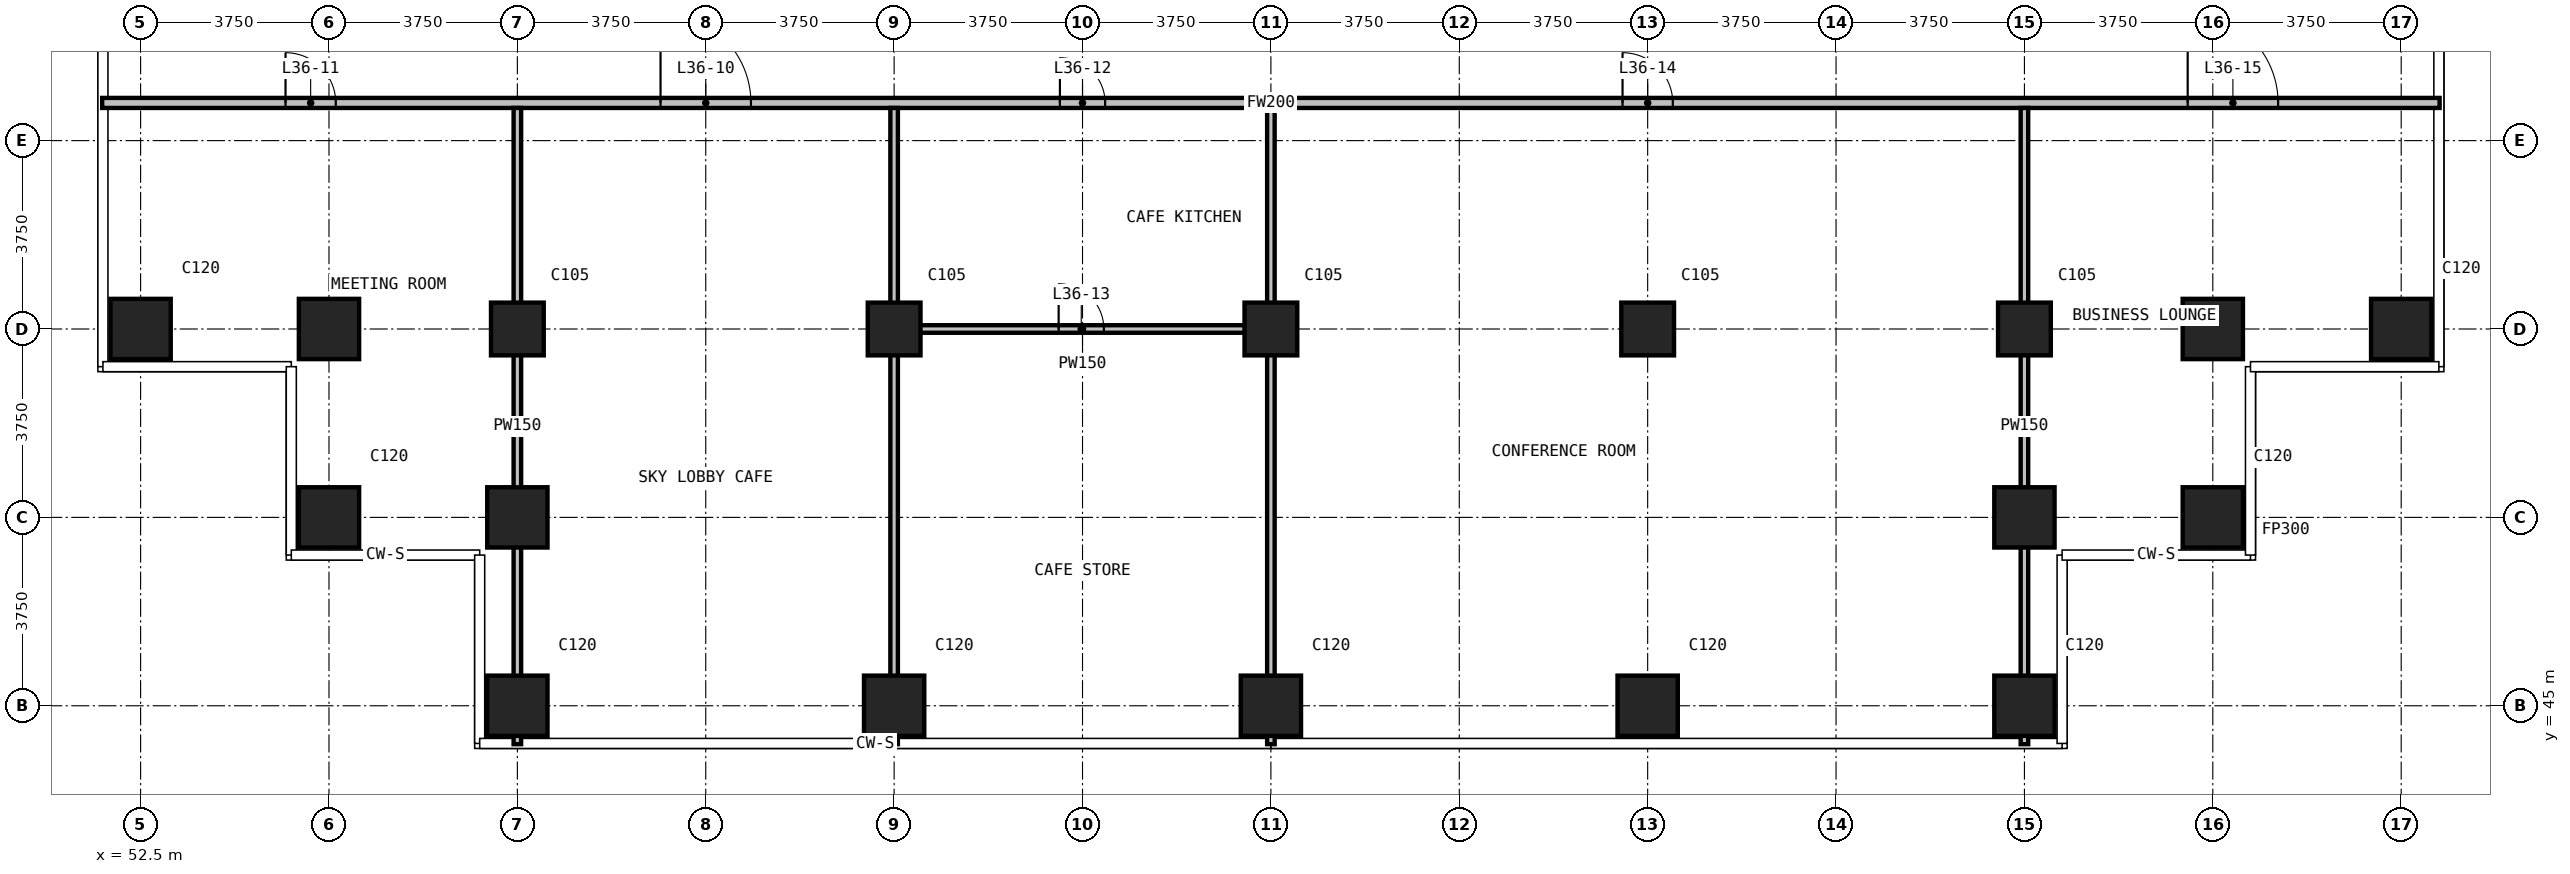
"""IFC4 building model, lengths in metres.
Left out: names, types, materials, properties, quantities, classifications, styles, units other than length and angle.
Written with IfcOpenShell. Run it as: python <this file> out.ifc"""

import sys

from ifc_helpers import new_model, si_unit, direction, frame, frame_2d, origin, origin_2d, place, context, subcontext, project, spatial, rectangle, extrude, element, fill, save


model = new_model("IFC4")
c1 = context("Model", 3, precision=1e-05, world=origin(), true_north=direction((0.0, 1.0)))
c2 = subcontext(c1, "Body", "Model", "MODEL_VIEW")
j1 = project(units=[si_unit("LENGTHUNIT", "METRE"), si_unit("PLANEANGLEUNIT", "RADIAN")], contexts=[c1])
p1 = place(None, origin())
s1 = spatial("IfcSite", under=j1, at=p1, CompositionType="ELEMENT")
p2 = place(p1, origin())
s2 = spatial("IfcBuilding", under=s1, at=p2, CompositionType="ELEMENT")
p3 = place(p2, frame((0.0, 0.0, 143.2)))
s3 = spatial("IfcBuildingStorey", under=s2, at=p3, CompositionType="ELEMENT", Elevation=143.2)
for number, where, z_axis, x_axis in (
    (1, (52.5, 52.5, 0.0), (0.0, 0.0, 1.0), (1.0, 0.0, 0.0)),
    (2, (56.25, 48.75, 0.0), (0.0, 0.0, 1.0), (1.0, 0.0, 0.0)),
    (3, (56.25, 52.5, 0.0), (0.0, 0.0, 1.0), (1.0, 0.0, 0.0)),
    (4, (60.0, 45.0, 0.0), (0.0, 0.0, 1.0), (1.0, 0.0, 0.0)),
    (5, (60.0, 48.75, 0.0), (0.0, 0.0, 1.0), (1.0, 0.0, 0.0)),
):
    element("IfcColumn", number, at=place(p3, frame(where, z_axis=z_axis, x_axis=x_axis)), inside=s3, PredefinedType="COLUMN", context=c2, shape_type="SweptSolid", body=[
        extrude(rectangle(XDim=1.2, YDim=1.2, at=origin_2d()), origin(), (0.0, 0.0, 1.0), 4.5),
    ])
p4 = place(p3, frame((60.0, 52.5, 0.0), z_axis=(0.0, 0.0, 1.0), x_axis=(1.0, 0.0, 0.0)))
e6 = element("IfcColumn", 6, at=p4, inside=s3, PredefinedType="COLUMN", context=c2, shape_type="SweptSolid", body=[
    extrude(rectangle(XDim=1.05, YDim=1.05, at=origin_2d()), origin(), (0.0, 0.0, 1.0), 4.5),
])
p5 = place(p3, frame((67.5, 45.0, 0.0), z_axis=(0.0, 0.0, 1.0), x_axis=(1.0, 0.0, 0.0)))
e7 = element("IfcColumn", 7, at=p5, inside=s3, PredefinedType="COLUMN", context=c2, shape_type="SweptSolid", body=[
    extrude(rectangle(XDim=1.2, YDim=1.2, at=origin_2d()), origin(), (0.0, 0.0, 1.0), 4.5),
])
p6 = place(p3, frame((67.5, 52.5, 0.0), z_axis=(0.0, 0.0, 1.0), x_axis=(1.0, 0.0, 0.0)))
e8 = element("IfcColumn", 8, at=p6, inside=s3, PredefinedType="COLUMN", context=c2, shape_type="SweptSolid", body=[
    extrude(rectangle(XDim=1.05, YDim=1.05, at=origin_2d()), origin(), (0.0, 0.0, 1.0), 4.5),
])
p7 = place(p3, frame((75.0, 45.0, 0.0), z_axis=(0.0, 0.0, 1.0), x_axis=(1.0, 0.0, 0.0)))
e9 = element("IfcColumn", 9, at=p7, inside=s3, PredefinedType="COLUMN", context=c2, shape_type="SweptSolid", body=[
    extrude(rectangle(XDim=1.2, YDim=1.2, at=origin_2d()), origin(), (0.0, 0.0, 1.0), 4.5),
])
p8 = place(p3, frame((75.0, 52.5, 0.0), z_axis=(0.0, 0.0, 1.0), x_axis=(1.0, 0.0, 0.0)))
e10 = element("IfcColumn", 10, at=p8, inside=s3, PredefinedType="COLUMN", context=c2, shape_type="SweptSolid", body=[
    extrude(rectangle(XDim=1.05, YDim=1.05, at=origin_2d()), origin(), (0.0, 0.0, 1.0), 4.5),
])
p9 = place(p3, frame((82.5, 45.0, 0.0), z_axis=(0.0, 0.0, 1.0), x_axis=(1.0, 0.0, 0.0)))
e11 = element("IfcColumn", 11, at=p9, inside=s3, PredefinedType="COLUMN", context=c2, shape_type="SweptSolid", body=[
    extrude(rectangle(XDim=1.2, YDim=1.2, at=origin_2d()), origin(), (0.0, 0.0, 1.0), 4.5),
])
p10 = place(p3, frame((82.5, 52.5, 0.0), z_axis=(0.0, 0.0, 1.0), x_axis=(1.0, 0.0, 0.0)))
e12 = element("IfcColumn", 12, at=p10, inside=s3, PredefinedType="COLUMN", context=c2, shape_type="SweptSolid", body=[
    extrude(rectangle(XDim=1.05, YDim=1.05, at=origin_2d()), origin(), (0.0, 0.0, 1.0), 4.5),
])
for number, where, z_axis, x_axis in (
    (13, (90.0, 45.0, 0.0), (0.0, 0.0, 1.0), (1.0, 0.0, 0.0)),
    (14, (90.0, 48.75, 0.0), (0.0, 0.0, 1.0), (1.0, 0.0, 0.0)),
):
    element("IfcColumn", number, at=place(p3, frame(where, z_axis=z_axis, x_axis=x_axis)), inside=s3, PredefinedType="COLUMN", context=c2, shape_type="SweptSolid", body=[
        extrude(rectangle(XDim=1.2, YDim=1.2, at=origin_2d()), origin(), (0.0, 0.0, 1.0), 4.5),
    ])
p11 = place(p3, frame((90.0, 52.5, 0.0), z_axis=(0.0, 0.0, 1.0), x_axis=(1.0, 0.0, 0.0)))
e15 = element("IfcColumn", 15, at=p11, inside=s3, PredefinedType="COLUMN", context=c2, shape_type="SweptSolid", body=[
    extrude(rectangle(XDim=1.05, YDim=1.05, at=origin_2d()), origin(), (0.0, 0.0, 1.0), 4.5),
])
for number, where, z_axis, x_axis in (
    (16, (93.75, 48.75, 0.0), (0.0, 0.0, 1.0), (1.0, 0.0, 0.0)),
    (17, (93.75, 52.5, 0.0), (0.0, 0.0, 1.0), (1.0, 0.0, 0.0)),
    (18, (97.5, 52.5, 0.0), (0.0, 0.0, 1.0), (1.0, 0.0, 0.0)),
):
    element("IfcColumn", number, at=place(p3, frame(where, z_axis=z_axis, x_axis=x_axis)), inside=s3, PredefinedType="COLUMN", context=c2, shape_type="SweptSolid", body=[
        extrude(rectangle(XDim=1.2, YDim=1.2, at=origin_2d()), origin(), (0.0, 0.0, 1.0), 4.5),
    ])
p12 = place(p3, frame((51.735, 57.0, 0.0), z_axis=(0.0, 0.0, 1.0), x_axis=(1.0, 0.0, 0.0)))
e19 = element("IfcWall", 19, at=p12, inside=s3, PredefinedType="PARTITIONING", context=c2, shape_type="SweptSolid", body=[
    extrude(rectangle(XDim=46.53, YDim=0.2, at=frame_2d((23.265, 0.0))), origin(), (0.0, 0.0, 1.0), 4.2),
])
p13 = place(p12, frame((11.115, 0.0, 0.0)))
e20 = element("IfcOpeningElement", 20, at=p13, cuts=e19, PredefinedType="OPENING", context=c2, shape_type="SweptSolid", body=[
    extrude(rectangle(XDim=1.8, YDim=2.2, at=frame_2d((0.9, 1.1))), frame((0.0, 0.11, 0.0), z_axis=(0.0, -1.0, 0.0), x_axis=(1.0, 0.0, 0.0)), (0.0, 0.0, 1.0), 0.22),
])
p14 = place(p12, frame((3.65, 0.0, 0.0)))
e21 = element("IfcOpeningElement", 21, at=p14, cuts=e19, PredefinedType="OPENING", context=c2, shape_type="SweptSolid", body=[
    extrude(rectangle(XDim=1.0, YDim=2.2, at=frame_2d((0.5, 1.1))), frame((0.0, 0.11, 0.0), z_axis=(0.0, -1.0, 0.0), x_axis=(1.0, 0.0, 0.0)), (0.0, 0.0, 1.0), 0.22),
])
p15 = place(p12, frame((19.065, 0.0, 0.0)))
e22 = element("IfcOpeningElement", 22, at=p15, cuts=e19, PredefinedType="OPENING", context=c2, shape_type="SweptSolid", body=[
    extrude(rectangle(XDim=0.9, YDim=2.2, at=frame_2d((0.45, 1.1))), frame((0.0, 0.11, 0.0), z_axis=(0.0, -1.0, 0.0), x_axis=(1.0, 0.0, 0.0)), (0.0, 0.0, 1.0), 0.22),
])
p16 = place(p12, frame((30.265, 0.0, 0.0)))
e23 = element("IfcOpeningElement", 23, at=p16, cuts=e19, PredefinedType="OPENING", context=c2, shape_type="SweptSolid", body=[
    extrude(rectangle(XDim=1.0, YDim=2.2, at=frame_2d((0.5, 1.1))), frame((0.0, 0.11, 0.0), z_axis=(0.0, -1.0, 0.0), x_axis=(1.0, 0.0, 0.0)), (0.0, 0.0, 1.0), 0.22),
])
p17 = place(p12, frame((41.515, 0.0, 0.0)))
e24 = element("IfcOpeningElement", 24, at=p17, cuts=e19, PredefinedType="OPENING", context=c2, shape_type="SweptSolid", body=[
    extrude(rectangle(XDim=1.8, YDim=2.2, at=frame_2d((0.9, 1.1))), frame((0.0, 0.11, 0.0), z_axis=(0.0, -1.0, 0.0), x_axis=(1.0, 0.0, 0.0)), (0.0, 0.0, 1.0), 0.22),
])
p18 = place(p3, frame((67.575, 52.5, 0.0), z_axis=(0.0, 0.0, 1.0), x_axis=(1.0, 0.0, 0.0)))
e25 = element("IfcWall", 25, at=p18, inside=s3, PredefinedType="PARTITIONING", context=c2, shape_type="SweptSolid", body=[
    extrude(rectangle(XDim=7.35, YDim=0.15, at=frame_2d((3.675, 0.0))), origin(), (0.0, 0.0, 1.0), 4.2),
])
p19 = place(p18, frame((3.2, 0.0, 0.0)))
e26 = element("IfcOpeningElement", 26, at=p19, cuts=e25, PredefinedType="OPENING", context=c2, shape_type="SweptSolid", body=[
    extrude(rectangle(XDim=0.9, YDim=2.2, at=frame_2d((0.45, 1.1))), frame((0.0, 0.085, 0.0), z_axis=(0.0, -1.0, 0.0), x_axis=(1.0, 0.0, 0.0)), (0.0, 0.0, 1.0), 0.17),
])
for number, where, z_axis, x_axis in (
    (27, (60.0, 44.235, 0.0), (0.0, 0.0, 1.0), (0.0, 1.0, 0.0)),
    (28, (67.5, 44.235, 0.0), (0.0, 0.0, 1.0), (0.0, 1.0, 0.0)),
    (29, (75.0, 44.235, 0.0), (0.0, 0.0, 1.0), (0.0, 1.0, 0.0)),
    (30, (90.0, 44.235, 0.0), (0.0, 0.0, 1.0), (0.0, 1.0, 0.0)),
):
    element("IfcWall", number, at=place(p3, frame(where, z_axis=z_axis, x_axis=x_axis)), inside=s3, PredefinedType="PARTITIONING", context=c2, shape_type="SweptSolid", body=[
        extrude(rectangle(XDim=12.665, YDim=0.15, at=frame_2d((6.333, 0.0))), origin(), (0.0, 0.0, 1.0), 4.2),
    ])
p20 = place(p13, origin())
e31 = element("IfcDoor", 31, at=p20, inside=s3, OperationType="DOUBLE_DOOR_SINGLE_SWING", PredefinedType="DOOR", context=c2, shape_type="SweptSolid", body=[
    extrude(rectangle(XDim=1.8, YDim=2.2, at=frame_2d((0.9, 1.1))), frame((0.0, 0.025, 0.0), z_axis=(0.0, -1.0, 0.0), x_axis=(1.0, 0.0, 0.0)), (0.0, 0.0, 1.0), 0.05),
])
fill(e20, e31)
p21 = place(p14, origin())
e32 = element("IfcDoor", 32, at=p21, inside=s3, OperationType="SINGLE_SWING_RIGHT", PredefinedType="DOOR", context=c2, shape_type="SweptSolid", body=[
    extrude(rectangle(XDim=1.0, YDim=2.2, at=frame_2d((0.5, 1.1))), frame((0.0, 0.025, 0.0), z_axis=(0.0, -1.0, 0.0), x_axis=(1.0, 0.0, 0.0)), (0.0, 0.0, 1.0), 0.05),
])
fill(e21, e32)
p22 = place(p15, origin())
e33 = element("IfcDoor", 33, at=p22, inside=s3, OperationType="SINGLE_SWING_RIGHT", PredefinedType="DOOR", context=c2, shape_type="SweptSolid", body=[
    extrude(rectangle(XDim=0.9, YDim=2.2, at=frame_2d((0.45, 1.1))), frame((0.0, 0.025, 0.0), z_axis=(0.0, -1.0, 0.0), x_axis=(1.0, 0.0, 0.0)), (0.0, 0.0, 1.0), 0.05),
])
fill(e22, e33)
p23 = place(p19, origin())
e34 = element("IfcDoor", 34, at=p23, inside=s3, OperationType="SINGLE_SWING_RIGHT", PredefinedType="DOOR", context=c2, shape_type="SweptSolid", body=[
    extrude(rectangle(XDim=0.9, YDim=2.2, at=frame_2d((0.45, 1.1))), frame((0.0, 0.025, 0.0), z_axis=(0.0, -1.0, 0.0), x_axis=(1.0, 0.0, 0.0)), (0.0, 0.0, 1.0), 0.05),
])
fill(e26, e34)
p24 = place(p16, origin())
e35 = element("IfcDoor", 35, at=p24, inside=s3, OperationType="SINGLE_SWING_LEFT", PredefinedType="DOOR", context=c2, shape_type="SweptSolid", body=[
    extrude(rectangle(XDim=1.0, YDim=2.2, at=frame_2d((0.5, 1.1))), frame((0.0, 0.025, 0.0), z_axis=(0.0, -1.0, 0.0), x_axis=(1.0, 0.0, 0.0)), (0.0, 0.0, 1.0), 0.05),
])
fill(e23, e35)
p25 = place(p17, origin())
e36 = element("IfcDoor", 36, at=p25, inside=s3, OperationType="DOUBLE_DOOR_SINGLE_SWING", PredefinedType="DOOR", context=c2, shape_type="SweptSolid", body=[
    extrude(rectangle(XDim=1.8, YDim=2.2, at=frame_2d((0.9, 1.1))), frame((0.0, 0.025, 0.0), z_axis=(0.0, -1.0, 0.0), x_axis=(1.0, 0.0, 0.0)), (0.0, 0.0, 1.0), 0.05),
])
fill(e24, e36)
save(model, sys.argv[1])
